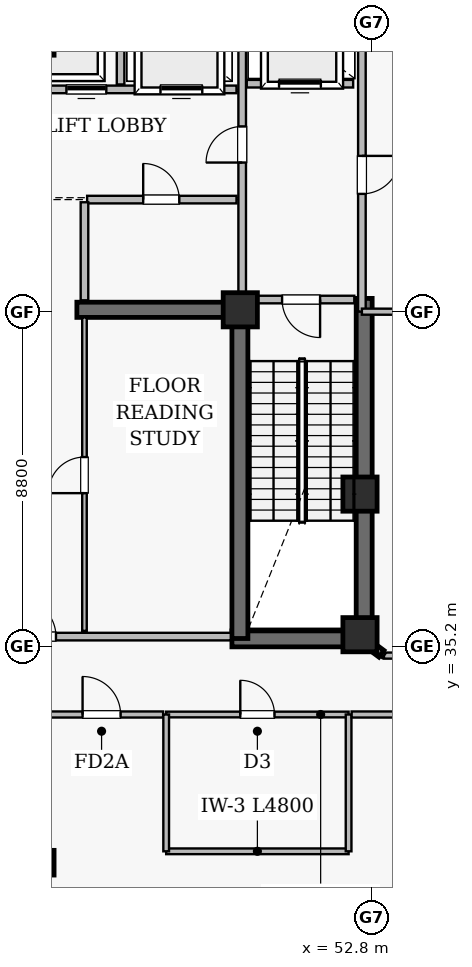
"""IFC4 building model, lengths in metres.
Left out: names, types, materials, properties, quantities, classifications, styles, units other than length and angle.
Written with IfcOpenShell. Run it as: python <this file> out.ifc"""

import sys

from ifc_helpers import new_model, si_unit, direction, frame, frame_2d, origin, origin_2d, place, context, subcontext, project, spatial, rectangle, extrude, element, fill, save


model = new_model("IFC4")
c1 = context("Model", 3, precision=1e-05, world=origin(), true_north=direction((0.0, 1.0)))
c2 = subcontext(c1, "Body", "Model", "MODEL_VIEW")
j1 = project(units=[si_unit("LENGTHUNIT", "METRE"), si_unit("PLANEANGLEUNIT", "RADIAN")], contexts=[c1])
p1 = place(None, origin())
s1 = spatial("IfcSite", under=j1, at=p1, CompositionType="ELEMENT")
p2 = place(p1, origin())
s2 = spatial("IfcBuilding", under=s1, at=p2, CompositionType="ELEMENT")
p3 = place(p2, frame((0.0, 0.0, 289.6)))
s3 = spatial("IfcBuildingStorey", under=s2, at=p3, CompositionType="ELEMENT", Elevation=289.6)
p4 = place(p3, frame((49.13, 35.39, 0.0), z_axis=(0.0, 0.0, 1.0), x_axis=(1.0, 0.0, 0.0)))
e1 = element("IfcWall", 1, at=p4, inside=s3, PredefinedType="SHEAR", context=c2, shape_type="SweptSolid", body=[
    extrude(rectangle(XDim=3.69, YDim=0.42, at=frame_2d((1.845, 0.0))), origin(), (0.0, 0.0, 1.0), 5.51),
])
p5 = place(p3, frame((52.61, 35.18, 0.0), z_axis=(0.0, 0.0, 1.0), x_axis=(0.0, 1.0, 0.0)))
e2 = element("IfcWall", 2, at=p5, inside=s3, PredefinedType="SHEAR", context=c2, shape_type="SweptSolid", body=[
    extrude(rectangle(XDim=9.17, YDim=0.42, at=frame_2d((4.585, 0.0))), origin(), (0.0, 0.0, 1.0), 5.51),
])
p6 = place(p3, frame((49.34, 35.4, 0.0), z_axis=(0.0, 0.0, 1.0), x_axis=(0.0, 1.0, 0.0)))
e3 = element("IfcWall", 3, at=p6, inside=s3, PredefinedType="SHEAR", context=c2, shape_type="SweptSolid", body=[
    extrude(rectangle(XDim=8.95, YDim=0.42, at=frame_2d((4.475, 0.0))), origin(), (0.0, 0.0, 1.0), 5.51),
])
p7 = place(p3, frame((45.05, 44.05, 0.0), z_axis=(0.0, 0.0, 1.0), x_axis=(1.0, 0.0, 0.0)))
e4 = element("IfcWall", 4, at=p7, inside=s3, PredefinedType="SHEAR", context=c2, shape_type="SweptSolid", body=[
    extrude(rectangle(XDim=4.2, YDim=0.4, at=frame_2d((2.1, 0.0))), origin(), (0.0, 0.0, 1.0), 5.51),
])
for number, where, z_axis, x_axis in (
    (5, (52.5, 35.5, 0.0), (0.0, 0.0, 1.0), (1.0, 0.0, 0.0)),
    (6, (52.5, 39.2, 0.0), (0.0, 0.0, 1.0), (1.0, 0.0, 0.0)),
    (7, (49.35, 44.05, 0.0), (0.0, 0.0, 1.0), (1.0, 0.0, 0.0)),
    (8, (44.0, 51.2, 0.0), (0.0, 0.0, 1.0), (1.0, 0.0, 0.0)),
):
    element("IfcColumn", number, at=place(p3, frame(where, z_axis=z_axis, x_axis=x_axis)), inside=s3, PredefinedType="COLUMN", context=c2, shape_type="SweptSolid", body=[
        extrude(rectangle(XDim=0.9, YDim=0.9, at=origin_2d()), origin(), (0.0, 0.0, 1.0), 5.8),
    ])
p8 = place(p3, frame((44.0, 29.5, 0.0), z_axis=(0.0, 0.0, 1.0), x_axis=(1.0, 0.0, 0.0)))
e9 = element("IfcColumn", 9, at=p8, inside=s3, PredefinedType="COLUMN", context=c2, shape_type="SweptSolid", body=[
    extrude(rectangle(XDim=0.9, YDim=0.65, at=origin_2d()), origin(), (0.0, 0.0, 1.0), 5.8),
])
p9 = place(p3, frame((38.9, 35.45, 0.0), z_axis=(0.0, 0.0, 1.0), x_axis=(1.0, 0.0, 0.0)))
e10 = element("IfcWall", 10, at=p9, inside=s3, PredefinedType="SOLIDWALL", context=c2, shape_type="SweptSolid", body=[
    extrude(rectangle(XDim=10.2, YDim=0.2, at=frame_2d((5.1, 0.0))), origin(), (0.0, 0.0, 1.0), 5.51),
])
p10 = place(p9, frame((4.6, 0.0, 0.0)))
e11 = element("IfcOpeningElement", 11, at=p10, cuts=e10, PredefinedType="OPENING", context=c2, shape_type="SweptSolid", body=[
    extrude(rectangle(XDim=1.0, YDim=2.15, at=frame_2d((0.5, 1.075))), frame((0.0, 0.11, 0.0), z_axis=(0.0, -1.0, 0.0), x_axis=(1.0, 0.0, 0.0)), (0.0, 0.0, 1.0), 0.22),
])
p11 = place(p3, frame((52.55, 44.001, 0.0), z_axis=(0.0, 0.0, 1.0), x_axis=(0.0, 1.0, 0.0)))
e12 = element("IfcWall", 12, at=p11, inside=s3, PredefinedType="SOLIDWALL", context=c2, shape_type="SweptSolid", body=[
    extrude(rectangle(XDim=8.419, YDim=0.2, at=frame_2d((4.209, 0.0))), origin(), (0.0, 0.0, 1.0), 5.51),
])
p12 = place(p11, frame((3.099, 0.0, 0.0)))
e13 = element("IfcOpeningElement", 13, at=p12, cuts=e12, PredefinedType="OPENING", context=c2, shape_type="SweptSolid", body=[
    extrude(rectangle(XDim=1.0, YDim=2.15, at=frame_2d((0.5, 1.075))), frame((0.0, 0.11, 0.0), z_axis=(0.0, -1.0, 0.0), x_axis=(1.0, 0.0, 0.0)), (0.0, 0.0, 1.0), 0.22),
])
p13 = place(p3, frame((45.25, 35.6, 0.0), z_axis=(0.0, 0.0, 1.0), x_axis=(0.0, 1.0, 0.0)))
e14 = element("IfcWall", 14, at=p13, inside=s3, PredefinedType="PARTITIONING", context=c2, shape_type="SweptSolid", body=[
    extrude(rectangle(XDim=8.25, YDim=0.12, at=frame_2d((4.125, 0.0))), origin(), (0.0, 0.0, 1.0), 5.51),
])
p14 = place(p13, frame((3.625, 0.0, 0.0)))
e15 = element("IfcOpeningElement", 15, at=p14, cuts=e14, PredefinedType="OPENING", context=c2, shape_type="SweptSolid", body=[
    extrude(rectangle(XDim=0.95, YDim=2.1, at=frame_2d((0.475, 1.05))), frame((0.0, 0.07, 0.0), z_axis=(0.0, -1.0, 0.0), x_axis=(1.0, 0.0, 0.0)), (0.0, 0.0, 1.0), 0.14),
])
p15 = place(p3, frame((49.4, 44.5, 0.0), z_axis=(0.0, 0.0, 1.0), x_axis=(0.0, 1.0, 0.0)))
e16 = element("IfcWall", 16, at=p15, inside=s3, PredefinedType="SOLIDWALL", context=c2, shape_type="SweptSolid", body=[
    extrude(rectangle(XDim=7.92, YDim=0.2, at=frame_2d((3.96, 0.0))), origin(), (0.0, 0.0, 1.0), 4.598),
])
p16 = place(p15, frame((3.425, 0.0, 0.0)))
e17 = element("IfcOpeningElement", 17, at=p16, cuts=e16, PredefinedType="OPENING", context=c2, shape_type="SweptSolid", body=[
    extrude(rectangle(XDim=0.95, YDim=2.15, at=frame_2d((0.475, 1.075))), frame((0.0, 0.11, 0.0), z_axis=(0.0, -1.0, 0.0), x_axis=(1.0, 0.0, 0.0)), (0.0, 0.0, 1.0), 0.22),
])
p17 = place(p3, frame((44.25, 49.85, 0.0), z_axis=(0.0, 0.0, 1.0), x_axis=(1.0, 0.0, 0.0)))
e18 = element("IfcWall", 18, at=p17, inside=s3, PredefinedType="SOLIDWALL", context=c2, shape_type="SweptSolid", body=[
    extrude(rectangle(XDim=5.0, YDim=0.2, at=frame_2d((2.5, 0.0))), origin(), (0.0, 0.0, 1.0), 4.598),
])
p18 = place(p17, frame((0.525, 0.0, 0.0)))
e19 = element("IfcOpeningElement", 19, at=p18, cuts=e18, PredefinedType="OPENING", context=c2, shape_type="SweptSolid", body=[
    extrude(rectangle(XDim=1.05, YDim=2.15, at=frame_2d((0.525, 1.075))), frame((0.0, 0.11, 0.0), z_axis=(0.0, -1.0, 0.0), x_axis=(1.0, 0.0, 0.0)), (0.0, 0.0, 1.0), 0.22),
])
p19 = place(p17, frame((3.0, 0.0, 0.0)))
e20 = element("IfcOpeningElement", 20, at=p19, cuts=e18, PredefinedType="OPENING", context=c2, shape_type="SweptSolid", body=[
    extrude(rectangle(XDim=1.1, YDim=2.15, at=frame_2d((0.55, 1.075))), frame((0.0, 0.11, 0.0), z_axis=(0.0, -1.0, 0.0), x_axis=(1.0, 0.0, 0.0)), (0.0, 0.0, 1.0), 0.22),
])
p20 = place(p3, frame((47.4, 33.4, 0.0), z_axis=(0.0, 0.0, 1.0), x_axis=(1.0, 0.0, 0.0)))
e21 = element("IfcWall", 21, at=p20, inside=s3, PredefinedType="PLUMBINGWALL", context=c2, shape_type="SweptSolid", body=[
    extrude(rectangle(XDim=4.8, YDim=0.15, at=frame_2d((2.4, 0.0))), origin(), (0.0, 0.0, 1.0), 4.848),
])
p21 = place(p20, frame((1.95, 0.0, 0.0)))
e22 = element("IfcOpeningElement", 22, at=p21, cuts=e21, PredefinedType="OPENING", context=c2, shape_type="SweptSolid", body=[
    extrude(rectangle(XDim=0.9, YDim=2.1, at=frame_2d((0.45, 1.05))), frame((0.0, 0.085, 0.0), z_axis=(0.0, -1.0, 0.0), x_axis=(1.0, 0.0, 0.0)), (0.0, 0.0, 1.0), 0.17),
])
p22 = place(p3, frame((45.32, 46.95, 0.0), z_axis=(0.0, 0.0, 1.0), x_axis=(1.0, 0.0, 0.0)))
e23 = element("IfcWall", 23, at=p22, inside=s3, PredefinedType="SOLIDWALL", context=c2, shape_type="SweptSolid", body=[
    extrude(rectangle(XDim=3.93, YDim=0.2, at=frame_2d((1.965, 0.0))), origin(), (0.0, 0.0, 1.0), 4.598),
])
p23 = place(p22, frame((1.475, 0.0, 0.0)))
e24 = element("IfcOpeningElement", 24, at=p23, cuts=e23, PredefinedType="OPENING", context=c2, shape_type="SweptSolid", body=[
    extrude(rectangle(XDim=0.95, YDim=2.1, at=frame_2d((0.475, 1.05))), frame((0.0, 0.11, 0.0), z_axis=(0.0, -1.0, 0.0), x_axis=(1.0, 0.0, 0.0)), (0.0, 0.0, 1.0), 0.22),
])
p24 = place(p3, frame((44.08, 33.4, 0.0), z_axis=(0.0, 0.0, 1.0), x_axis=(1.0, 0.0, 0.0)))
e25 = element("IfcWall", 25, at=p24, inside=s3, PredefinedType="SOLIDWALL", context=c2, shape_type="SweptSolid", body=[
    extrude(rectangle(XDim=3.24, YDim=0.16, at=frame_2d((1.62, 0.0))), origin(), (0.0, 0.0, 1.0), 5.51),
])
p25 = place(p24, frame((1.12, 0.0, 0.0)))
e26 = element("IfcOpeningElement", 26, at=p25, cuts=e25, PredefinedType="OPENING", context=c2, shape_type="SweptSolid", body=[
    extrude(rectangle(XDim=1.0, YDim=2.15, at=frame_2d((0.5, 1.075))), frame((0.0, 0.09, 0.0), z_axis=(0.0, -1.0, 0.0), x_axis=(1.0, 0.0, 0.0)), (0.0, 0.0, 1.0), 0.18),
])
p26 = place(p3, frame((49.55, 44.32, 0.0), z_axis=(0.0, 0.0, 1.0), x_axis=(1.0, 0.0, 0.0)))
e27 = element("IfcWall", 27, at=p26, inside=s3, PredefinedType="SOLIDWALL", context=c2, shape_type="SweptSolid", body=[
    extrude(rectangle(XDim=2.8, YDim=0.2, at=frame_2d((1.4, 0.0))), origin(), (0.0, 0.0, 1.0), 4.598),
])
p27 = place(p26, frame((0.9, 0.0, 0.0)))
e28 = element("IfcOpeningElement", 28, at=p27, cuts=e27, PredefinedType="OPENING", context=c2, shape_type="SweptSolid", body=[
    extrude(rectangle(XDim=1.0, YDim=2.15, at=frame_2d((0.5, 1.075))), frame((0.0, 0.11, 0.0), z_axis=(0.0, -1.0, 0.0), x_axis=(1.0, 0.0, 0.0)), (0.0, 0.0, 1.0), 0.22),
])
p28 = place(p3, frame((49.52, 50.0, 0.0), z_axis=(0.0, 0.0, 1.0), x_axis=(1.0, 0.0, 0.0)))
e29 = element("IfcWall", 29, at=p28, inside=s3, PredefinedType="SOLIDWALL", context=c2, shape_type="SweptSolid", body=[
    extrude(rectangle(XDim=2.8, YDim=0.2, at=frame_2d((1.4, 0.0))), origin(), (0.0, 0.0, 1.0), 5.51),
])
p29 = place(p28, frame((0.85, 0.0, 0.0)))
e30 = element("IfcOpeningElement", 30, at=p29, cuts=e29, PredefinedType="OPENING", context=c2, shape_type="SweptSolid", body=[
    extrude(rectangle(XDim=1.1, YDim=2.15, at=frame_2d((0.55, 1.075))), frame((0.0, 0.11, 0.0), z_axis=(0.0, -1.0, 0.0), x_axis=(1.0, 0.0, 0.0)), (0.0, 0.0, 1.0), 0.22),
])
p30 = place(p3, frame((60.461, 43.985, 0.0), z_axis=(0.0, 0.0, 1.0), x_axis=(-0.999997925631, 0.002036844215, 0.0)))
e31 = element("IfcWall", 31, at=p30, inside=s3, PredefinedType="SOLIDWALL", context=c2, shape_type="SweptSolid", body=[
    extrude(rectangle(XDim=7.911, YDim=0.16, at=frame_2d((3.956, 0.0))), origin(), (0.0, 0.0, 1.0), 4.848),
])
p31 = place(p3, frame((47.4, 29.8, 0.0), z_axis=(0.0, 0.0, 1.0), x_axis=(1.0, 0.0, 0.0)))
e32 = element("IfcWall", 32, at=p31, inside=s3, PredefinedType="PLUMBINGWALL", context=c2, shape_type="SweptSolid", body=[
    extrude(rectangle(XDim=4.8, YDim=0.15, at=frame_2d((2.4, 0.0))), origin(), (0.0, 0.0, 1.0), 5.51),
])
p32 = place(p3, frame((47.4, 33.4, 0.0), z_axis=(0.0, 0.0, 1.0), x_axis=(0.0, -1.0, 0.0)))
e33 = element("IfcWall", 33, at=p32, inside=s3, PredefinedType="PLUMBINGWALL", context=c2, shape_type="SweptSolid", body=[
    extrude(rectangle(XDim=3.6, YDim=0.15, at=frame_2d((1.8, 0.0))), origin(), (0.0, 0.0, 1.0), 4.848),
])
p33 = place(p3, frame((52.2, 29.8, 0.0), z_axis=(0.0, 0.0, 1.0), x_axis=(0.0, 1.0, 0.0)))
e34 = element("IfcWall", 34, at=p33, inside=s3, PredefinedType="PLUMBINGWALL", context=c2, shape_type="SweptSolid", body=[
    extrude(rectangle(XDim=3.6, YDim=0.15, at=frame_2d((1.8, 0.0))), origin(), (0.0, 0.0, 1.0), 5.51),
])
p34 = place(p3, frame((45.25, 44.3, 0.0), z_axis=(0.0, 0.0, 1.0), x_axis=(0.0, 1.0, 0.0)))
e35 = element("IfcWall", 35, at=p34, inside=s3, PredefinedType="SOLIDWALL", context=c2, shape_type="SweptSolid", body=[
    extrude(rectangle(XDim=2.58, YDim=0.2, at=frame_2d((1.29, 0.0))), origin(), (0.0, 0.0, 1.0), 5.51),
])
p35 = place(p3, frame((46.2, 49.98, 0.0), z_axis=(0.0, 0.0, 1.0), x_axis=(0.0, 1.0, 0.0)))
e36 = element("IfcWall", 36, at=p35, inside=s3, PredefinedType="SOLIDWALL", context=c2, shape_type="SweptSolid", body=[
    extrude(rectangle(XDim=2.37, YDim=0.2, at=frame_2d((1.185, 0.0))), origin(), (0.0, 0.0, 1.0), 5.51),
])
p36 = place(p3, frame((52.28, 33.4, 0.0), z_axis=(0.0, 0.0, 1.0), x_axis=(1.0, 0.0, 0.0)))
e37 = element("IfcWall", 37, at=p36, inside=s3, PredefinedType="SOLIDWALL", context=c2, shape_type="SweptSolid", body=[
    extrude(rectangle(XDim=2.24, YDim=0.16, at=frame_2d((1.12, 0.0))), origin(), (0.0, 0.0, 1.0), 5.51),
])
p37 = place(p3, frame((54.52, 34.95, 0.0), z_axis=(0.0, 0.0, 1.0), x_axis=(-1.0, 0.0, 0.0)))
e38 = element("IfcWall", 38, at=p37, inside=s3, PredefinedType="SOLIDWALL", context=c2, shape_type="SweptSolid", body=[
    extrude(rectangle(XDim=1.39, YDim=0.16, at=frame_2d((0.695, 0.0))), origin(), (0.0, 0.0, 1.0), 4.848),
])
p38 = place(p3, frame((53.13, 34.95, 0.0), z_axis=(0.0, 0.0, 1.0), x_axis=(-0.802951496235, 0.596044373092, 0.0)))
e39 = element("IfcWall", 39, at=p38, inside=s3, PredefinedType="SOLIDWALL", context=c2, shape_type="SweptSolid", body=[
    extrude(rectangle(XDim=0.386, YDim=0.16, at=frame_2d((0.193, 0.0))), origin(), (0.0, 0.0, 1.0), 5.51),
])
p39 = place(p27, frame((1.0, 0.0, 0.0), z_axis=(0.0, 0.0, 1.0), x_axis=(-1.0, 0.0, 0.0)))
e40 = element("IfcDoor", 40, at=p39, inside=s3, OperationType="SINGLE_SWING_RIGHT", PredefinedType="DOOR", context=c2, shape_type="SweptSolid", body=[
    extrude(rectangle(XDim=1.0, YDim=2.15, at=frame_2d((0.5, 1.075))), frame((0.0, 0.025, 0.0), z_axis=(0.0, -1.0, 0.0), x_axis=(1.0, 0.0, 0.0)), (0.0, 0.0, 1.0), 0.05),
])
fill(e28, e40)
p40 = place(p12, frame((1.0, 0.0, 0.0), z_axis=(0.0, 0.0, 1.0), x_axis=(-1.0, 0.0, 0.0)))
e41 = element("IfcDoor", 41, at=p40, inside=s3, OperationType="SINGLE_SWING_RIGHT", PredefinedType="DOOR", context=c2, shape_type="SweptSolid", body=[
    extrude(rectangle(XDim=1.0, YDim=2.15, at=frame_2d((0.5, 1.075))), frame((0.0, 0.025, 0.0), z_axis=(0.0, -1.0, 0.0), x_axis=(1.0, 0.0, 0.0)), (0.0, 0.0, 1.0), 0.05),
])
fill(e13, e41)
p41 = place(p16, origin())
e42 = element("IfcDoor", 42, at=p41, inside=s3, OperationType="SINGLE_SWING_LEFT", PredefinedType="DOOR", context=c2, shape_type="SweptSolid", body=[
    extrude(rectangle(XDim=0.95, YDim=2.15, at=frame_2d((0.475, 1.075))), frame((0.0, 0.025, 0.0), z_axis=(0.0, -1.0, 0.0), x_axis=(1.0, 0.0, 0.0)), (0.0, 0.0, 1.0), 0.05),
])
fill(e17, e42)
p42 = place(p29, origin())
e43 = element("IfcDoor", 43, at=p42, inside=s3, OperationType="SLIDING_TO_LEFT", PredefinedType="DOOR", context=c2, shape_type="SweptSolid", body=[
    extrude(rectangle(XDim=1.1, YDim=2.15, at=frame_2d((0.55, 1.075))), frame((0.0, 0.025, 0.0), z_axis=(0.0, -1.0, 0.0), x_axis=(1.0, 0.0, 0.0)), (0.0, 0.0, 1.0), 0.05),
])
fill(e30, e43)
p43 = place(p10, origin())
e44 = element("IfcDoor", 44, at=p43, inside=s3, OperationType="SINGLE_SWING_LEFT", PredefinedType="DOOR", context=c2, shape_type="SweptSolid", body=[
    extrude(rectangle(XDim=1.0, YDim=2.15, at=frame_2d((0.5, 1.075))), frame((0.0, 0.025, 0.0), z_axis=(0.0, -1.0, 0.0), x_axis=(1.0, 0.0, 0.0)), (0.0, 0.0, 1.0), 0.05),
])
fill(e11, e44)
p44 = place(p18, origin())
e45 = element("IfcDoor", 45, at=p44, inside=s3, OperationType="SLIDING_TO_LEFT", PredefinedType="DOOR", context=c2, shape_type="SweptSolid", body=[
    extrude(rectangle(XDim=1.05, YDim=2.15, at=frame_2d((0.525, 1.075))), frame((0.0, 0.025, 0.0), z_axis=(0.0, -1.0, 0.0), x_axis=(1.0, 0.0, 0.0)), (0.0, 0.0, 1.0), 0.05),
])
fill(e19, e45)
p45 = place(p19, origin())
e46 = element("IfcDoor", 46, at=p45, inside=s3, OperationType="SLIDING_TO_LEFT", PredefinedType="DOOR", context=c2, shape_type="SweptSolid", body=[
    extrude(rectangle(XDim=1.1, YDim=2.15, at=frame_2d((0.55, 1.075))), frame((0.0, 0.025, 0.0), z_axis=(0.0, -1.0, 0.0), x_axis=(1.0, 0.0, 0.0)), (0.0, 0.0, 1.0), 0.05),
])
fill(e20, e46)
p46 = place(p23, origin())
e47 = element("IfcDoor", 47, at=p46, inside=s3, OperationType="SINGLE_SWING_LEFT", PredefinedType="DOOR", context=c2, shape_type="SweptSolid", body=[
    extrude(rectangle(XDim=0.95, YDim=2.1, at=frame_2d((0.475, 1.05))), frame((0.0, 0.025, 0.0), z_axis=(0.0, -1.0, 0.0), x_axis=(1.0, 0.0, 0.0)), (0.0, 0.0, 1.0), 0.05),
])
fill(e24, e47)
p47 = place(p14, origin())
e48 = element("IfcDoor", 48, at=p47, inside=s3, OperationType="SINGLE_SWING_LEFT", PredefinedType="DOOR", context=c2, shape_type="SweptSolid", body=[
    extrude(rectangle(XDim=0.95, YDim=2.1, at=frame_2d((0.475, 1.05))), frame((0.0, 0.025, 0.0), z_axis=(0.0, -1.0, 0.0), x_axis=(1.0, 0.0, 0.0)), (0.0, 0.0, 1.0), 0.05),
])
fill(e15, e48)
p48 = place(p21, origin())
e49 = element("IfcDoor", 49, at=p48, inside=s3, OperationType="SINGLE_SWING_LEFT", PredefinedType="DOOR", context=c2, shape_type="SweptSolid", body=[
    extrude(rectangle(XDim=0.9, YDim=2.1, at=frame_2d((0.45, 1.05))), frame((0.0, 0.025, 0.0), z_axis=(0.0, -1.0, 0.0), x_axis=(1.0, 0.0, 0.0)), (0.0, 0.0, 1.0), 0.05),
])
fill(e22, e49)
p49 = place(p25, origin())
e50 = element("IfcDoor", 50, at=p49, inside=s3, OperationType="SINGLE_SWING_LEFT", PredefinedType="DOOR", context=c2, shape_type="SweptSolid", body=[
    extrude(rectangle(XDim=1.0, YDim=2.15, at=frame_2d((0.5, 1.075))), frame((0.0, 0.025, 0.0), z_axis=(0.0, -1.0, 0.0), x_axis=(1.0, 0.0, 0.0)), (0.0, 0.0, 1.0), 0.05),
])
fill(e26, e50)
save(model, sys.argv[1])
